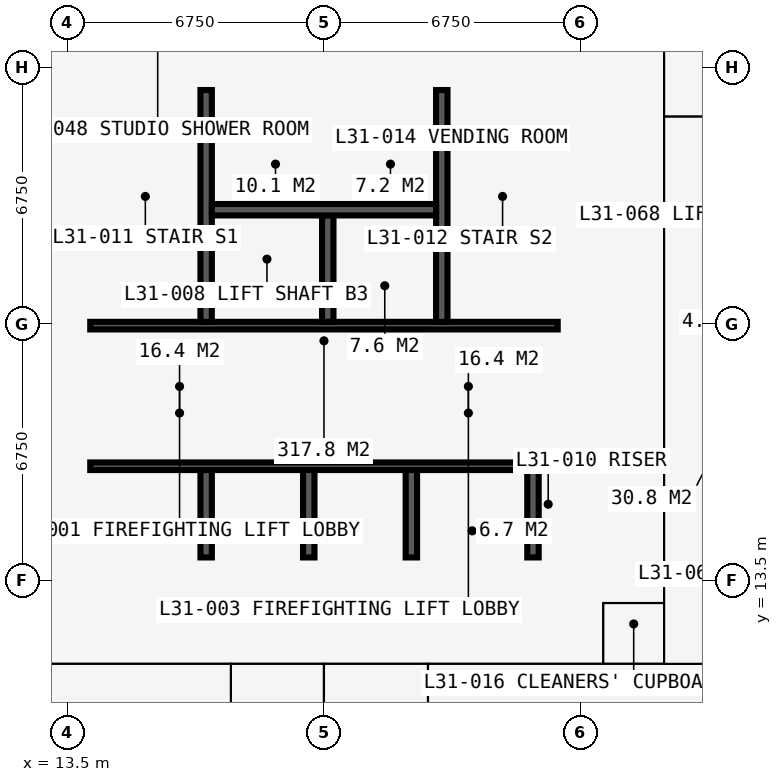
"""IFC4 building model, lengths in metres.
Left out: names, types, materials, properties, quantities, classifications, styles, units other than length and angle.
Written with IfcOpenShell. Run it as: python <this file> out.ifc"""

import sys

from ifc_helpers import new_model, si_unit, direction, frame, frame_2d, origin, place, context, subcontext, project, spatial, rectangle, extrude, element, fill, save


model = new_model("IFC4")
c1 = context("Model", 3, precision=1e-05, world=origin(), true_north=direction((0.0, 1.0)))
c2 = subcontext(c1, "Body", "Model", "MODEL_VIEW")
j1 = project(units=[si_unit("LENGTHUNIT", "METRE"), si_unit("PLANEANGLEUNIT", "RADIAN")], contexts=[c1])
p1 = place(None, origin())
s1 = spatial("IfcSite", under=j1, at=p1, CompositionType="ELEMENT")
p2 = place(p1, origin())
s2 = spatial("IfcBuilding", under=s1, at=p2, CompositionType="ELEMENT")
p3 = place(p2, frame((0.0, 0.0, 116.1)))
s3 = spatial("IfcBuildingStorey", under=s2, at=p3, CompositionType="ELEMENT", Elevation=116.1)
p4 = place(p3, frame((12.9, 13.5, 0.0), z_axis=(0.0, 0.0, 1.0), x_axis=(1.0, 0.0, 0.0)))
e1 = element("IfcWall", 1, at=p4, inside=s3, PredefinedType="SHEAR", context=c2, shape_type="SweptSolid", body=[
    extrude(rectangle(XDim=14.7, YDim=1.2, at=frame_2d((7.35, 0.0))), origin(), (0.0, 0.0, 1.0), 3.6),
])
p5 = place(p3, frame((27.0, 14.1, 0.0), z_axis=(0.0, 0.0, 1.0), x_axis=(0.0, 1.0, 0.0)))
e2 = element("IfcWall", 2, at=p5, inside=s3, PredefinedType="SHEAR", context=c2, shape_type="SweptSolid", body=[
    extrude(rectangle(XDim=12.3, YDim=1.2, at=frame_2d((6.15, 0.0))), origin(), (0.0, 0.0, 1.0), 3.6),
])
p6 = place(p5, frame((3.65, 0.0, 0.0)))
e3 = element("IfcOpeningElement", 3, at=p6, cuts=e2, PredefinedType="OPENING", context=c2, shape_type="SweptSolid", body=[
    extrude(rectangle(XDim=1.2, YDim=2.2, at=frame_2d((0.6, 1.1))), frame((0.0, 0.61, 0.0), z_axis=(0.0, -1.0, 0.0), x_axis=(1.0, 0.0, 0.0)), (0.0, 0.0, 1.0), 1.22),
])
p7 = place(p3, frame((27.6, 27.0, 0.0), z_axis=(0.0, 0.0, 1.0), x_axis=(-1.0, 0.0, 0.0)))
e4 = element("IfcWall", 4, at=p7, inside=s3, PredefinedType="SHEAR", context=c2, shape_type="SweptSolid", body=[
    extrude(rectangle(XDim=14.7, YDim=1.2, at=frame_2d((7.35, 0.0))), origin(), (0.0, 0.0, 1.0), 3.6),
])
p8 = place(p7, frame((4.55, 0.0, 0.0)))
e5 = element("IfcOpeningElement", 5, at=p8, cuts=e4, PredefinedType="OPENING", context=c2, shape_type="SweptSolid", body=[
    extrude(rectangle(XDim=0.9, YDim=2.2, at=frame_2d((0.45, 1.1))), frame((0.0, 0.61, 0.0), z_axis=(0.0, -1.0, 0.0), x_axis=(1.0, 0.0, 0.0)), (0.0, 0.0, 1.0), 1.22),
])
p9 = place(p7, frame((7.525, 0.0, 0.0)))
e6 = element("IfcOpeningElement", 6, at=p9, cuts=e4, PredefinedType="OPENING", context=c2, shape_type="SweptSolid", body=[
    extrude(rectangle(XDim=1.0, YDim=2.2, at=frame_2d((0.5, 1.1))), frame((0.0, 0.61, 0.0), z_axis=(0.0, -1.0, 0.0), x_axis=(1.0, 0.0, 0.0)), (0.0, 0.0, 1.0), 1.22),
])
p10 = place(p3, frame((13.5, 26.4, 0.0), z_axis=(0.0, 0.0, 1.0), x_axis=(0.0, -1.0, 0.0)))
e7 = element("IfcWall", 7, at=p10, inside=s3, PredefinedType="SHEAR", context=c2, shape_type="SweptSolid", body=[
    extrude(rectangle(XDim=12.3, YDim=1.2, at=frame_2d((6.15, 0.0))), origin(), (0.0, 0.0, 1.0), 3.6),
])
p11 = place(p10, frame((7.45, 0.0, 0.0)))
e8 = element("IfcOpeningElement", 8, at=p11, cuts=e7, PredefinedType="OPENING", context=c2, shape_type="SweptSolid", body=[
    extrude(rectangle(XDim=1.2, YDim=2.2, at=frame_2d((0.6, 1.1))), frame((0.0, 0.61, 0.0), z_axis=(0.0, -1.0, 0.0), x_axis=(1.0, 0.0, 0.0)), (0.0, 0.0, 1.0), 1.22),
])
p12 = place(p3, frame((14.1, 16.5, 0.0), z_axis=(0.0, 0.0, 1.0), x_axis=(1.0, 0.0, 0.0)))
e9 = element("IfcWall", 9, at=p12, inside=s3, PredefinedType="SHEAR", context=c2, shape_type="SweptSolid", body=[
    extrude(rectangle(XDim=12.3, YDim=0.2, at=frame_2d((6.15, 0.0))), origin(), (0.0, 0.0, 1.0), 3.6),
])
p13 = place(p12, frame((0.9, 0.0, 0.0)))
e10 = element("IfcOpeningElement", 10, at=p13, cuts=e9, PredefinedType="OPENING", context=c2, shape_type="SweptSolid", body=[
    extrude(rectangle(XDim=1.1, YDim=2.2, at=frame_2d((0.55, 1.1))), frame((0.0, 0.11, 0.0), z_axis=(0.0, -1.0, 0.0), x_axis=(1.0, 0.0, 0.0)), (0.0, 0.0, 1.0), 0.22),
])
p14 = place(p12, frame((9.5, 0.0, 0.0)))
e11 = element("IfcOpeningElement", 11, at=p14, cuts=e9, PredefinedType="OPENING", context=c2, shape_type="SweptSolid", body=[
    extrude(rectangle(XDim=1.1, YDim=2.2, at=frame_2d((0.55, 1.1))), frame((0.0, 0.11, 0.0), z_axis=(0.0, -1.0, 0.0), x_axis=(1.0, 0.0, 0.0)), (0.0, 0.0, 1.0), 0.22),
])
p15 = place(p3, frame((14.1, 20.2, 0.0), z_axis=(0.0, 0.0, 1.0), x_axis=(1.0, 0.0, 0.0)))
e12 = element("IfcWall", 12, at=p15, inside=s3, PredefinedType="SHEAR", context=c2, shape_type="SweptSolid", body=[
    extrude(rectangle(XDim=12.3, YDim=0.2, at=frame_2d((6.15, 0.0))), origin(), (0.0, 0.0, 1.0), 3.6),
])
p16 = place(p15, frame((0.35, 0.0, 0.0)))
e13 = element("IfcOpeningElement", 13, at=p16, cuts=e12, PredefinedType="OPENING", context=c2, shape_type="SweptSolid", body=[
    extrude(rectangle(XDim=1.1, YDim=2.2, at=frame_2d((0.55, 1.1))), frame((0.0, 0.11, 0.0), z_axis=(0.0, -1.0, 0.0), x_axis=(1.0, 0.0, 0.0)), (0.0, 0.0, 1.0), 0.22),
])
p17 = place(p15, frame((9.75, 0.0, 0.0)))
e14 = element("IfcOpeningElement", 14, at=p17, cuts=e12, PredefinedType="OPENING", context=c2, shape_type="SweptSolid", body=[
    extrude(rectangle(XDim=1.1, YDim=2.2, at=frame_2d((0.55, 1.1))), frame((0.0, 0.11, 0.0), z_axis=(0.0, -1.0, 0.0), x_axis=(1.0, 0.0, 0.0)), (0.0, 0.0, 1.0), 0.22),
])
for number, where, z_axis, x_axis in (
    (15, (17.15, 20.3, 0.0), (0.0, 0.0, 1.0), (0.0, 1.0, 0.0)),
    (16, (23.35, 20.3, 0.0), (0.0, 0.0, 1.0), (0.0, 1.0, 0.0)),
):
    element("IfcWall", number, at=place(p3, frame(where, z_axis=z_axis, x_axis=x_axis)), inside=s3, PredefinedType="SHEAR", context=c2, shape_type="SweptSolid", body=[
        extrude(rectangle(XDim=6.1, YDim=0.3, at=frame_2d((3.05, 0.0))), origin(), (0.0, 0.0, 1.0), 3.6),
    ])
p18 = place(p3, frame((20.35, 20.3, 0.0), z_axis=(0.0, 0.0, 1.0), x_axis=(0.0, 1.0, 0.0)))
e17 = element("IfcWall", 17, at=p18, inside=s3, PredefinedType="SHEAR", context=c2, shape_type="SweptSolid", body=[
    extrude(rectangle(XDim=2.8, YDim=0.3, at=frame_2d((1.4, 0.0))), origin(), (0.0, 0.0, 1.0), 3.6),
])
p19 = place(p3, frame((17.3, 23.25, 0.0), z_axis=(0.0, 0.0, 1.0), x_axis=(1.0, 0.0, 0.0)))
e18 = element("IfcWall", 18, at=p19, inside=s3, PredefinedType="SHEAR", context=c2, shape_type="SweptSolid", body=[
    extrude(rectangle(XDim=5.9, YDim=0.3, at=frame_2d((2.95, 0.0))), origin(), (0.0, 0.0, 1.0), 3.6),
])
for number, where, z_axis, x_axis in (
    (19, (17.15, 14.1, 0.0), (0.0, 0.0, 1.0), (0.0, 1.0, 0.0)),
    (20, (19.85, 14.1, 0.0), (0.0, 0.0, 1.0), (0.0, 1.0, 0.0)),
    (21, (22.55, 14.1, 0.0), (0.0, 0.0, 1.0), (0.0, 1.0, 0.0)),
    (22, (25.75, 14.1, 0.0), (0.0, 0.0, 1.0), (0.0, 1.0, 0.0)),
):
    element("IfcWall", number, at=place(p3, frame(where, z_axis=z_axis, x_axis=x_axis)), inside=s3, PredefinedType="SHEAR", context=c2, shape_type="SweptSolid", body=[
        extrude(rectangle(XDim=2.3, YDim=0.3, at=frame_2d((1.15, 0.0))), origin(), (0.0, 0.0, 1.0), 3.6),
    ])
p20 = place(p3, frame((18.875, 16.6, 0.0), z_axis=(0.0, 0.0, 1.0), x_axis=(0.0, 1.0, 0.0)))
e23 = element("IfcWall", 23, at=p20, inside=s3, PredefinedType="PARTITIONING", context=c2, shape_type="SweptSolid", body=[
    extrude(rectangle(XDim=3.5, YDim=0.15, at=frame_2d((1.75, 0.0))), origin(), (0.0, 0.0, 1.0), 3.375),
])
p21 = place(p20, frame((1.15, 0.0, 0.0)))
e24 = element("IfcOpeningElement", 24, at=p21, cuts=e23, PredefinedType="OPENING", context=c2, shape_type="SweptSolid", body=[
    extrude(rectangle(XDim=1.2, YDim=2.2, at=frame_2d((0.6, 1.1))), frame((0.0, 0.085, 0.0), z_axis=(0.0, -1.0, 0.0), x_axis=(1.0, 0.0, 0.0)), (0.0, 0.0, 1.0), 0.17),
])
p22 = place(p3, frame((21.625, 16.6, 0.0), z_axis=(0.0, 0.0, 1.0), x_axis=(0.0, 1.0, 0.0)))
e25 = element("IfcWall", 25, at=p22, inside=s3, PredefinedType="PARTITIONING", context=c2, shape_type="SweptSolid", body=[
    extrude(rectangle(XDim=3.5, YDim=0.15, at=frame_2d((1.75, 0.0))), origin(), (0.0, 0.0, 1.0), 3.375),
])
p23 = place(p22, frame((1.15, 0.0, 0.0)))
e26 = element("IfcOpeningElement", 26, at=p23, cuts=e25, PredefinedType="OPENING", context=c2, shape_type="SweptSolid", body=[
    extrude(rectangle(XDim=1.2, YDim=2.2, at=frame_2d((0.6, 1.1))), frame((0.0, 0.085, 0.0), z_axis=(0.0, -1.0, 0.0), x_axis=(1.0, 0.0, 0.0)), (0.0, 0.0, 1.0), 0.17),
])
p24 = place(p3, frame((20.725, 23.4, 0.0), z_axis=(0.0, 0.0, 1.0), x_axis=(0.0, 1.0, 0.0)))
e27 = element("IfcWall", 27, at=p24, inside=s3, PredefinedType="PARTITIONING", context=c2, shape_type="SweptSolid", body=[
    extrude(rectangle(XDim=3.0, YDim=0.15, at=frame_2d((1.5, 0.0))), origin(), (0.0, 0.0, 1.0), 3.375),
])
p25 = place(p3, frame((10.125, 11.3, 0.0), z_axis=(0.0, 0.0, 1.0), x_axis=(1.0, 0.0, 0.0)))
e28 = element("IfcWall", 28, at=p25, inside=s3, PredefinedType="PARTITIONING", context=c2, shape_type="SweptSolid", body=[
    extrude(rectangle(XDim=20.675, YDim=0.15, at=frame_2d((10.337, 0.0))), origin(), (0.0, 0.0, 1.0), 3.375),
])
p26 = place(p25, frame((8.375, 0.0, 0.0)))
e29 = element("IfcOpeningElement", 29, at=p26, cuts=e28, PredefinedType="OPENING", context=c2, shape_type="SweptSolid", body=[
    extrude(rectangle(XDim=1.0, YDim=2.2, at=frame_2d((0.5, 1.1))), frame((0.0, 0.085, 0.0), z_axis=(0.0, -1.0, 0.0), x_axis=(1.0, 0.0, 0.0)), (0.0, 0.0, 1.0), 0.17),
])
p27 = place(p25, frame((10.975, 0.0, 0.0)))
e30 = element("IfcOpeningElement", 30, at=p27, cuts=e28, PredefinedType="OPENING", context=c2, shape_type="SweptSolid", body=[
    extrude(rectangle(XDim=1.0, YDim=2.2, at=frame_2d((0.5, 1.1))), frame((0.0, 0.085, 0.0), z_axis=(0.0, -1.0, 0.0), x_axis=(1.0, 0.0, 0.0)), (0.0, 0.0, 1.0), 0.17),
])
p28 = place(p25, frame((3.925, 0.0, 0.0)))
e31 = element("IfcOpeningElement", 31, at=p28, cuts=e28, PredefinedType="OPENING", context=c2, shape_type="SweptSolid", body=[
    extrude(rectangle(XDim=0.95, YDim=2.2, at=frame_2d((0.475, 1.1))), frame((0.0, 0.085, 0.0), z_axis=(0.0, -1.0, 0.0), x_axis=(1.0, 0.0, 0.0)), (0.0, 0.0, 1.0), 0.17),
])
p29 = place(p3, frame((17.8, 5.65, 0.0), z_axis=(0.0, 0.0, 1.0), x_axis=(0.0, 1.0, 0.0)))
e32 = element("IfcWall", 32, at=p29, inside=s3, PredefinedType="PARTITIONING", context=c2, shape_type="SweptSolid", body=[
    extrude(rectangle(XDim=5.65, YDim=0.15, at=frame_2d((2.825, 0.0))), origin(), (0.0, 0.0, 1.0), 3.375),
])
p30 = place(p3, frame((20.25, -0.734, 0.0), z_axis=(0.0, 0.0, 1.0), x_axis=(0.0, 1.0, 0.0)))
e33 = element("IfcWall", 33, at=p30, inside=s3, PredefinedType="PARTITIONING", context=c2, shape_type="SweptSolid", body=[
    extrude(rectangle(XDim=12.034, YDim=0.15, at=frame_2d((6.017, 0.0))), origin(), (0.0, 0.0, 1.0), 2.61),
])
p31 = place(p3, frame((22.988, 5.65, 0.0), z_axis=(0.0, 0.0, 1.0), x_axis=(0.0, 1.0, 0.0)))
e34 = element("IfcWall", 34, at=p31, inside=s3, PredefinedType="PARTITIONING", context=c2, shape_type="SweptSolid", body=[
    extrude(rectangle(XDim=5.65, YDim=0.15, at=frame_2d((2.825, 0.0))), origin(), (0.0, 0.0, 1.0), 3.375),
])
p32 = place(p3, frame((27.6, 11.3, 0.0), z_axis=(0.0, 0.0, 1.0), x_axis=(0.0, 1.0, 0.0)))
e35 = element("IfcWall", 35, at=p32, inside=s3, PredefinedType="PARTITIONING", context=c2, shape_type="SweptSolid", body=[
    extrude(rectangle(XDim=1.6, YDim=0.15, at=frame_2d((0.8, 0.0))), origin(), (0.0, 0.0, 1.0), 3.375),
])
p33 = place(p32, frame((0.3, 0.0, 0.0)))
e36 = element("IfcOpeningElement", 36, at=p33, cuts=e35, PredefinedType="OPENING", context=c2, shape_type="SweptSolid", body=[
    extrude(rectangle(XDim=0.95, YDim=2.2, at=frame_2d((0.475, 1.1))), frame((0.0, 0.085, 0.0), z_axis=(0.0, -1.0, 0.0), x_axis=(1.0, 0.0, 0.0)), (0.0, 0.0, 1.0), 0.17),
])
p34 = place(p3, frame((27.6, 12.9, 0.0), z_axis=(0.0, 0.0, 1.0), x_axis=(1.0, 0.0, 0.0)))
e37 = element("IfcWall", 37, at=p34, inside=s3, PredefinedType="PARTITIONING", context=c2, shape_type="SweptSolid", body=[
    extrude(rectangle(XDim=1.6, YDim=0.15, at=frame_2d((0.8, 0.0))), origin(), (0.0, 0.0, 1.0), 2.806),
])
p35 = place(p3, frame((29.2, 11.3, 0.0), z_axis=(0.0, 0.0, 1.0), x_axis=(0.0, 1.0, 0.0)))
e38 = element("IfcWall", 38, at=p35, inside=s3, PredefinedType="PARTITIONING", context=c2, shape_type="SweptSolid", body=[
    extrude(rectangle(XDim=17.9, YDim=0.2, at=frame_2d((8.95, 0.0))), origin(), (0.0, 0.0, 1.0), 3.375),
])
p36 = place(p35, frame((8.35, 0.0, 0.0)))
e39 = element("IfcOpeningElement", 39, at=p36, cuts=e38, PredefinedType="OPENING", context=c2, shape_type="SweptSolid", body=[
    extrude(rectangle(XDim=1.2, YDim=2.2, at=frame_2d((0.6, 1.1))), frame((0.0, 0.11, 0.0), z_axis=(0.0, -1.0, 0.0), x_axis=(1.0, 0.0, 0.0)), (0.0, 0.0, 1.0), 0.22),
])
p37 = place(p3, frame((29.2, 25.7, 0.0), z_axis=(0.0, 0.0, 1.0), x_axis=(1.0, 0.0, 0.0)))
e40 = element("IfcWall", 40, at=p37, inside=s3, PredefinedType="SHEAR", context=c2, shape_type="SweptSolid", body=[
    extrude(rectangle(XDim=3.45, YDim=0.1, at=frame_2d((1.725, 0.0))), origin(), (0.0, 0.0, 1.0), 3.375),
])
p38 = place(p13, origin())
e41 = element("IfcDoor", 41, at=p38, inside=s3, OperationType="DOUBLE_DOOR_SLIDING", PredefinedType="DOOR", context=c2, shape_type="SweptSolid", body=[
    extrude(rectangle(XDim=1.1, YDim=2.2, at=frame_2d((0.55, 1.1))), frame((0.0, 0.025, 0.0), z_axis=(0.0, -1.0, 0.0), x_axis=(1.0, 0.0, 0.0)), (0.0, 0.0, 1.0), 0.05),
])
fill(e10, e41)
p39 = place(p14, origin())
e42 = element("IfcDoor", 42, at=p39, inside=s3, OperationType="DOUBLE_DOOR_SLIDING", PredefinedType="DOOR", context=c2, shape_type="SweptSolid", body=[
    extrude(rectangle(XDim=1.1, YDim=2.2, at=frame_2d((0.55, 1.1))), frame((0.0, 0.025, 0.0), z_axis=(0.0, -1.0, 0.0), x_axis=(1.0, 0.0, 0.0)), (0.0, 0.0, 1.0), 0.05),
])
fill(e11, e42)
p40 = place(p11, origin())
e43 = element("IfcDoor", 43, at=p40, inside=s3, OperationType="DOUBLE_DOOR_SINGLE_SWING", PredefinedType="DOOR", context=c2, shape_type="SweptSolid", body=[
    extrude(rectangle(XDim=1.2, YDim=2.2, at=frame_2d((0.6, 1.1))), frame((0.0, 0.025, 0.0), z_axis=(0.0, -1.0, 0.0), x_axis=(1.0, 0.0, 0.0)), (0.0, 0.0, 1.0), 0.05),
])
fill(e8, e43)
p41 = place(p6, origin())
e44 = element("IfcDoor", 44, at=p41, inside=s3, OperationType="DOUBLE_DOOR_SINGLE_SWING", PredefinedType="DOOR", context=c2, shape_type="SweptSolid", body=[
    extrude(rectangle(XDim=1.2, YDim=2.2, at=frame_2d((0.6, 1.1))), frame((0.0, 0.025, 0.0), z_axis=(0.0, -1.0, 0.0), x_axis=(1.0, 0.0, 0.0)), (0.0, 0.0, 1.0), 0.05),
])
fill(e3, e44)
p42 = place(p21, origin())
e45 = element("IfcDoor", 45, at=p42, inside=s3, OperationType="DOUBLE_DOOR_SINGLE_SWING", PredefinedType="DOOR", context=c2, shape_type="SweptSolid", body=[
    extrude(rectangle(XDim=1.2, YDim=2.2, at=frame_2d((0.6, 1.1))), frame((0.0, 0.025, 0.0), z_axis=(0.0, -1.0, 0.0), x_axis=(1.0, 0.0, 0.0)), (0.0, 0.0, 1.0), 0.05),
])
fill(e24, e45)
p43 = place(p23, origin())
e46 = element("IfcDoor", 46, at=p43, inside=s3, OperationType="DOUBLE_DOOR_SINGLE_SWING", PredefinedType="DOOR", context=c2, shape_type="SweptSolid", body=[
    extrude(rectangle(XDim=1.2, YDim=2.2, at=frame_2d((0.6, 1.1))), frame((0.0, 0.025, 0.0), z_axis=(0.0, -1.0, 0.0), x_axis=(1.0, 0.0, 0.0)), (0.0, 0.0, 1.0), 0.05),
])
fill(e26, e46)
p44 = place(p8, origin())
e47 = element("IfcDoor", 47, at=p44, inside=s3, OperationType="SINGLE_SWING_LEFT", PredefinedType="DOOR", context=c2, shape_type="SweptSolid", body=[
    extrude(rectangle(XDim=0.9, YDim=2.2, at=frame_2d((0.45, 1.1))), frame((0.0, 0.4, 0.0), z_axis=(0.0, -1.0, 0.0), x_axis=(1.0, 0.0, 0.0)), (0.0, 0.0, 1.0), 0.8),
])
fill(e5, e47)
p45 = place(p9, origin())
e48 = element("IfcDoor", 48, at=p45, inside=s3, OperationType="SINGLE_SWING_LEFT", PredefinedType="DOOR", context=c2, shape_type="SweptSolid", body=[
    extrude(rectangle(XDim=1.0, YDim=2.2, at=frame_2d((0.5, 1.1))), frame((0.0, 0.025, 0.0), z_axis=(0.0, -1.0, 0.0), x_axis=(1.0, 0.0, 0.0)), (0.0, 0.0, 1.0), 0.05),
])
fill(e6, e48)
p46 = place(p16, origin())
e49 = element("IfcDoor", 49, at=p46, inside=s3, OperationType="SINGLE_SWING_LEFT", PredefinedType="DOOR", context=c2, shape_type="SweptSolid", body=[
    extrude(rectangle(XDim=1.1, YDim=2.2, at=frame_2d((0.55, 1.1))), frame((0.0, 0.025, 0.0), z_axis=(0.0, -1.0, 0.0), x_axis=(1.0, 0.0, 0.0)), (0.0, 0.0, 1.0), 0.05),
])
fill(e13, e49)
p47 = place(p17, origin())
e50 = element("IfcDoor", 50, at=p47, inside=s3, OperationType="SINGLE_SWING_LEFT", PredefinedType="DOOR", context=c2, shape_type="SweptSolid", body=[
    extrude(rectangle(XDim=1.1, YDim=2.2, at=frame_2d((0.55, 1.1))), frame((0.0, 0.025, 0.0), z_axis=(0.0, -1.0, 0.0), x_axis=(1.0, 0.0, 0.0)), (0.0, 0.0, 1.0), 0.05),
])
fill(e14, e50)
p48 = place(p33, origin())
e51 = element("IfcDoor", 51, at=p48, inside=s3, OperationType="SINGLE_SWING_LEFT", PredefinedType="DOOR", context=c2, shape_type="SweptSolid", body=[
    extrude(rectangle(XDim=0.95, YDim=2.2, at=frame_2d((0.475, 1.1))), frame((0.0, 0.025, 0.0), z_axis=(0.0, -1.0, 0.0), x_axis=(1.0, 0.0, 0.0)), (0.0, 0.0, 1.0), 0.05),
])
fill(e36, e51)
p49 = place(p26, origin())
e52 = element("IfcDoor", 52, at=p49, inside=s3, OperationType="SINGLE_SWING_LEFT", PredefinedType="DOOR", context=c2, shape_type="SweptSolid", body=[
    extrude(rectangle(XDim=1.0, YDim=2.2, at=frame_2d((0.5, 1.1))), frame((0.0, 0.025, 0.0), z_axis=(0.0, -1.0, 0.0), x_axis=(1.0, 0.0, 0.0)), (0.0, 0.0, 1.0), 0.05),
])
fill(e29, e52)
p50 = place(p27, origin())
e53 = element("IfcDoor", 53, at=p50, inside=s3, OperationType="SINGLE_SWING_LEFT", PredefinedType="DOOR", context=c2, shape_type="SweptSolid", body=[
    extrude(rectangle(XDim=1.0, YDim=2.2, at=frame_2d((0.5, 1.1))), frame((0.0, 0.025, 0.0), z_axis=(0.0, -1.0, 0.0), x_axis=(1.0, 0.0, 0.0)), (0.0, 0.0, 1.0), 0.05),
])
fill(e30, e53)
p51 = place(p28, origin())
e54 = element("IfcDoor", 54, at=p51, inside=s3, OperationType="SINGLE_SWING_LEFT", PredefinedType="DOOR", context=c2, shape_type="SweptSolid", body=[
    extrude(rectangle(XDim=0.95, YDim=2.2, at=frame_2d((0.475, 1.1))), frame((0.0, 0.025, 0.0), z_axis=(0.0, -1.0, 0.0), x_axis=(1.0, 0.0, 0.0)), (0.0, 0.0, 1.0), 0.05),
])
fill(e31, e54)
p52 = place(p36, origin())
e55 = element("IfcDoor", 55, at=p52, inside=s3, OperationType="DOUBLE_DOOR_SINGLE_SWING", PredefinedType="DOOR", context=c2, shape_type="SweptSolid", body=[
    extrude(rectangle(XDim=1.2, YDim=2.2, at=frame_2d((0.6, 1.1))), frame((0.0, 0.025, 0.0), z_axis=(0.0, -1.0, 0.0), x_axis=(1.0, 0.0, 0.0)), (0.0, 0.0, 1.0), 0.05),
])
fill(e39, e55)
save(model, sys.argv[1])
